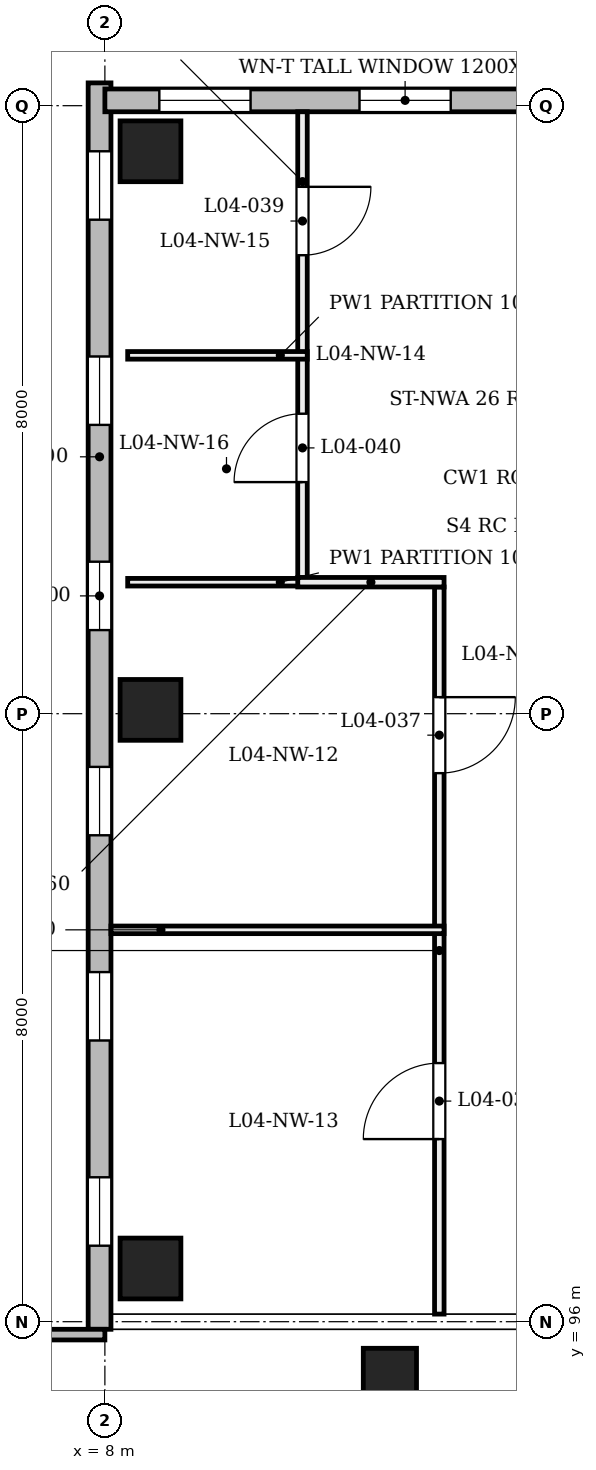
"""IFC4 building model, lengths in metres.
Left out: names, types, materials, properties, quantities, classifications, styles, units other than length and angle.
Written with IfcOpenShell. Run it as: python <this file> out.ifc"""

import sys

from ifc_helpers import new_model, si_unit, direction, frame, frame_2d, origin, origin_2d, place, context, subcontext, project, spatial, rectangle, extrude, element, fill, save


model = new_model("IFC4")
c1 = context("Model", 3, precision=1e-05, world=origin(), true_north=direction((0.0, 1.0)))
c2 = subcontext(c1, "Body", "Model", "MODEL_VIEW")
j1 = project(units=[si_unit("LENGTHUNIT", "METRE"), si_unit("PLANEANGLEUNIT", "RADIAN")], contexts=[c1])
p1 = place(None, origin())
s1 = spatial("IfcSite", under=j1, at=p1, CompositionType="ELEMENT")
p2 = place(p1, origin())
s2 = spatial("IfcBuilding", under=s1, at=p2, CompositionType="ELEMENT")
p3 = place(p2, frame((0.0, 0.0, 19.2)))
s3 = spatial("IfcBuildingStorey", under=s2, at=p3, CompositionType="ELEMENT", Elevation=19.2)
for number, where, z_axis, x_axis in (
    (1, (8.6, 96.7, 0.0), (0.0, 0.0, 1.0), (1.0, 0.0, 0.0)),
    (2, (8.6, 104.05, 0.0), (0.0, 0.0, 1.0), (1.0, 0.0, 0.0)),
    (3, (8.6, 111.4, 0.0), (0.0, 0.0, 1.0), (1.0, 0.0, 0.0)),
):
    element("IfcColumn", number, at=place(p3, frame(where, z_axis=z_axis, x_axis=x_axis)), inside=s3, PredefinedType="COLUMN", context=c2, shape_type="SweptSolid", body=[
        extrude(rectangle(XDim=0.8, YDim=0.8, at=origin_2d()), origin(), (0.0, 0.0, 1.0), 4.8),
    ])
p4 = place(p3, frame((12.0, 95.3, 0.0), z_axis=(-0.203952265704, 0.0, 0.978980833987), x_axis=(0.0, -1.0, 0.0)))
e4 = element("IfcColumn", 4, at=p4, inside=s3, PredefinedType="COLUMN", context=c2, shape_type="SweptSolid", body=[
    extrude(rectangle(XDim=0.7, YDim=0.7, at=origin_2d()), origin(), (0.0, 0.0, 1.0), 4.903),
])
p5 = place(p3, frame((7.93, 95.9, 0.0), z_axis=(0.0, 0.0, 1.0), x_axis=(0.0, 1.0, 0.0)))
e5 = element("IfcWall", 5, at=p5, inside=s3, PredefinedType="SOLIDWALL", context=c2, shape_type="SweptSolid", body=[
    extrude(rectangle(XDim=16.4, YDim=0.3, at=frame_2d((8.2, 0.0))), origin(), (0.0, 0.0, 1.0), 3.9),
])
p6 = place(p5, frame((1.1, 0.0, 0.75)))
e6 = element("IfcOpeningElement", 6, at=p6, cuts=e5, PredefinedType="OPENING", context=c2, shape_type="SweptSolid", body=[
    extrude(rectangle(XDim=0.9, YDim=3.1, at=frame_2d((0.45, 1.55))), frame((0.0, 0.16, 0.0), z_axis=(0.0, -1.0, 0.0), x_axis=(1.0, 0.0, 0.0)), (0.0, 0.0, 1.0), 0.32),
])
p7 = place(p5, frame((3.8, 0.0, 0.75)))
e7 = element("IfcOpeningElement", 7, at=p7, cuts=e5, PredefinedType="OPENING", context=c2, shape_type="SweptSolid", body=[
    extrude(rectangle(XDim=0.9, YDim=3.1, at=frame_2d((0.45, 1.55))), frame((0.0, 0.16, 0.0), z_axis=(0.0, -1.0, 0.0), x_axis=(1.0, 0.0, 0.0)), (0.0, 0.0, 1.0), 0.32),
])
p8 = place(p5, frame((6.5, 0.0, 0.75)))
e8 = element("IfcOpeningElement", 8, at=p8, cuts=e5, PredefinedType="OPENING", context=c2, shape_type="SweptSolid", body=[
    extrude(rectangle(XDim=0.9, YDim=3.1, at=frame_2d((0.45, 1.55))), frame((0.0, 0.16, 0.0), z_axis=(0.0, -1.0, 0.0), x_axis=(1.0, 0.0, 0.0)), (0.0, 0.0, 1.0), 0.32),
])
p9 = place(p5, frame((9.2, 0.0, 0.75)))
e9 = element("IfcOpeningElement", 9, at=p9, cuts=e5, PredefinedType="OPENING", context=c2, shape_type="SweptSolid", body=[
    extrude(rectangle(XDim=0.9, YDim=3.1, at=frame_2d((0.45, 1.55))), frame((0.0, 0.16, 0.0), z_axis=(0.0, -1.0, 0.0), x_axis=(1.0, 0.0, 0.0)), (0.0, 0.0, 1.0), 0.32),
])
p10 = place(p5, frame((11.9, 0.0, 0.75)))
e10 = element("IfcOpeningElement", 10, at=p10, cuts=e5, PredefinedType="OPENING", context=c2, shape_type="SweptSolid", body=[
    extrude(rectangle(XDim=0.9, YDim=3.1, at=frame_2d((0.45, 1.55))), frame((0.0, 0.16, 0.0), z_axis=(0.0, -1.0, 0.0), x_axis=(1.0, 0.0, 0.0)), (0.0, 0.0, 1.0), 0.32),
])
p11 = place(p5, frame((14.6, 0.0, 0.75)))
e11 = element("IfcOpeningElement", 11, at=p11, cuts=e5, PredefinedType="OPENING", context=c2, shape_type="SweptSolid", body=[
    extrude(rectangle(XDim=0.9, YDim=3.1, at=frame_2d((0.45, 1.55))), frame((0.0, 0.16, 0.0), z_axis=(0.0, -1.0, 0.0), x_axis=(1.0, 0.0, 0.0)), (0.0, 0.0, 1.0), 0.32),
])
p12 = place(p3, frame((8.0, 112.07, 0.0), z_axis=(0.0, 0.0, 1.0), x_axis=(1.0, 0.0, 0.0)))
e12 = element("IfcWall", 12, at=p12, inside=s3, PredefinedType="SOLIDWALL", context=c2, shape_type="SweptSolid", body=[
    extrude(rectangle(XDim=7.9, YDim=0.3, at=frame_2d((3.95, 0.0))), origin(), (0.0, 0.0, 1.0), 3.9),
])
p13 = place(p12, frame((0.717, 0.0, 0.75)))
e13 = element("IfcOpeningElement", 13, at=p13, cuts=e12, PredefinedType="OPENING", context=c2, shape_type="SweptSolid", body=[
    extrude(rectangle(XDim=1.2, YDim=3.1, at=frame_2d((0.6, 1.55))), frame((0.0, 0.16, 0.0), z_axis=(0.0, -1.0, 0.0), x_axis=(1.0, 0.0, 0.0)), (0.0, 0.0, 1.0), 0.32),
])
p14 = place(p12, frame((3.35, 0.0, 0.75)))
e14 = element("IfcOpeningElement", 14, at=p14, cuts=e12, PredefinedType="OPENING", context=c2, shape_type="SweptSolid", body=[
    extrude(rectangle(XDim=1.2, YDim=3.1, at=frame_2d((0.6, 1.55))), frame((0.0, 0.16, 0.0), z_axis=(0.0, -1.0, 0.0), x_axis=(1.0, 0.0, 0.0)), (0.0, 0.0, 1.0), 0.32),
])
p15 = place(p12, frame((5.983, 0.0, 0.75)))
e15 = element("IfcOpeningElement", 15, at=p15, cuts=e12, PredefinedType="OPENING", context=c2, shape_type="SweptSolid", body=[
    extrude(rectangle(XDim=1.2, YDim=3.1, at=frame_2d((0.6, 1.55))), frame((0.0, 0.16, 0.0), z_axis=(0.0, -1.0, 0.0), x_axis=(1.0, 0.0, 0.0)), (0.0, 0.0, 1.0), 0.32),
])
p16 = place(p3, frame((4.0, 95.83, 0.0), z_axis=(0.0, 0.0, 1.0), x_axis=(1.0, 0.0, 0.0)))
e16 = element("IfcWall", 16, at=p16, inside=s3, PredefinedType="SOLIDWALL", context=c2, shape_type="SweptSolid", body=[
    extrude(rectangle(XDim=4.0, YDim=0.14, at=frame_2d((2.0, 0.0))), origin(), (0.0, 0.0, 1.0), 3.9),
])
p17 = place(p3, frame((12.4, 96.1, 0.0), z_axis=(0.0, 0.0, 1.0), x_axis=(0.0, 1.0, 0.0)))
e17 = element("IfcWall", 17, at=p17, inside=s3, PredefinedType="PARTITIONING", context=c2, shape_type="SweptSolid", body=[
    extrude(rectangle(XDim=9.567, YDim=0.125, at=frame_2d((4.783, 0.0))), origin(), (0.0, 0.0, 1.0), 3.88),
])
p18 = place(p17, frame((7.118, 0.0, 0.0)))
e18 = element("IfcOpeningElement", 18, at=p18, cuts=e17, PredefinedType="OPENING", context=c2, shape_type="SweptSolid", body=[
    extrude(rectangle(XDim=1.0, YDim=2.1, at=frame_2d((0.5, 1.05))), frame((0.0, 0.073, 0.0), z_axis=(0.0, -1.0, 0.0), x_axis=(1.0, 0.0, 0.0)), (0.0, 0.0, 1.0), 0.145),
])
p19 = place(p17, frame((2.303, 0.0, 0.0)))
e19 = element("IfcOpeningElement", 19, at=p19, cuts=e17, PredefinedType="OPENING", context=c2, shape_type="SweptSolid", body=[
    extrude(rectangle(XDim=1.0, YDim=2.1, at=frame_2d((0.5, 1.05))), frame((0.0, 0.073, 0.0), z_axis=(0.0, -1.0, 0.0), x_axis=(1.0, 0.0, 0.0)), (0.0, 0.0, 1.0), 0.145),
])
p20 = place(p3, frame((10.6, 105.792, 0.0), z_axis=(0.0, 0.0, 1.0), x_axis=(0.0, 1.0, 0.0)))
e20 = element("IfcWall", 20, at=p20, inside=s3, PredefinedType="PARTITIONING", context=c2, shape_type="SweptSolid", body=[
    extrude(rectangle(XDim=6.128, YDim=0.125, at=frame_2d((3.064, 0.0))), origin(), (0.0, 0.0, 1.0), 3.88),
])
p21 = place(p20, frame((4.24, 0.0, 0.0)))
e21 = element("IfcOpeningElement", 21, at=p21, cuts=e20, PredefinedType="OPENING", context=c2, shape_type="SweptSolid", body=[
    extrude(rectangle(XDim=0.9, YDim=2.1, at=frame_2d((0.45, 1.05))), frame((0.0, 0.073, 0.0), z_axis=(0.0, -1.0, 0.0), x_axis=(1.0, 0.0, 0.0)), (0.0, 0.0, 1.0), 0.145),
])
p22 = place(p20, frame((1.255, 0.0, 0.0)))
e22 = element("IfcOpeningElement", 22, at=p22, cuts=e20, PredefinedType="OPENING", context=c2, shape_type="SweptSolid", body=[
    extrude(rectangle(XDim=0.9, YDim=2.1, at=frame_2d((0.45, 1.05))), frame((0.0, 0.073, 0.0), z_axis=(0.0, -1.0, 0.0), x_axis=(1.0, 0.0, 0.0)), (0.0, 0.0, 1.0), 0.145),
])
p23 = place(p3, frame((8.08, 101.156, 0.0), z_axis=(0.0, 0.0, 1.0), x_axis=(1.0, 0.0, 0.0)))
e23 = element("IfcWall", 23, at=p23, inside=s3, PredefinedType="PARTITIONING", context=c2, shape_type="SweptSolid", body=[
    extrude(rectangle(XDim=4.382, YDim=0.1, at=frame_2d((2.191, 0.0))), origin(), (0.0, 0.0, 1.0), 3.88),
])
p24 = place(p3, frame((8.3, 105.73, 0.0), z_axis=(0.0, 0.0, 1.0), x_axis=(1.0, 0.0, 0.0)))
e24 = element("IfcWall", 24, at=p24, inside=s3, PredefinedType="PARTITIONING", context=c2, shape_type="SweptSolid", body=[
    extrude(rectangle(XDim=2.363, YDim=0.1, at=frame_2d((1.181, 0.0))), origin(), (0.0, 0.0, 1.0), 3.98),
])
p25 = place(p3, frame((10.538, 105.73, 0.0), z_axis=(0.0, 0.0, 1.0), x_axis=(1.0, 0.0, 0.0)))
e25 = element("IfcWall", 25, at=p25, inside=s3, PredefinedType="PARTITIONING", context=c2, shape_type="SweptSolid", body=[
    extrude(rectangle(XDim=1.925, YDim=0.125, at=frame_2d((0.962, 0.0))), origin(), (0.0, 0.0, 1.0), 4.56),
])
p26 = place(p3, frame((8.3, 108.715, 0.0), z_axis=(0.0, 0.0, 1.0), x_axis=(1.0, 0.0, 0.0)))
e26 = element("IfcWall", 26, at=p26, inside=s3, PredefinedType="PARTITIONING", context=c2, shape_type="SweptSolid", body=[
    extrude(rectangle(XDim=2.363, YDim=0.1, at=frame_2d((1.181, 0.0))), origin(), (0.0, 0.0, 1.0), 3.98),
])
p27 = place(p6, origin())
e27 = element("IfcWindow", 27, at=p27, inside=s3, PartitioningType="SINGLE_PANEL", PredefinedType="WINDOW", context=c2, shape_type="SweptSolid", body=[
    extrude(rectangle(XDim=0.9, YDim=3.1, at=frame_2d((0.45, 1.55))), frame((0.0, 0.03, 0.0), z_axis=(0.0, -1.0, 0.0), x_axis=(1.0, 0.0, 0.0)), (0.0, 0.0, 1.0), 0.06),
])
fill(e6, e27)
p28 = place(p7, origin())
e28 = element("IfcWindow", 28, at=p28, inside=s3, PartitioningType="SINGLE_PANEL", PredefinedType="WINDOW", context=c2, shape_type="SweptSolid", body=[
    extrude(rectangle(XDim=0.9, YDim=3.1, at=frame_2d((0.45, 1.55))), frame((0.0, 0.03, 0.0), z_axis=(0.0, -1.0, 0.0), x_axis=(1.0, 0.0, 0.0)), (0.0, 0.0, 1.0), 0.06),
])
fill(e7, e28)
p29 = place(p8, origin())
e29 = element("IfcWindow", 29, at=p29, inside=s3, PartitioningType="SINGLE_PANEL", PredefinedType="WINDOW", context=c2, shape_type="SweptSolid", body=[
    extrude(rectangle(XDim=0.9, YDim=3.1, at=frame_2d((0.45, 1.55))), frame((0.0, 0.03, 0.0), z_axis=(0.0, -1.0, 0.0), x_axis=(1.0, 0.0, 0.0)), (0.0, 0.0, 1.0), 0.06),
])
fill(e8, e29)
p30 = place(p9, origin())
e30 = element("IfcWindow", 30, at=p30, inside=s3, PartitioningType="SINGLE_PANEL", PredefinedType="WINDOW", context=c2, shape_type="SweptSolid", body=[
    extrude(rectangle(XDim=0.9, YDim=3.1, at=frame_2d((0.45, 1.55))), frame((0.0, 0.03, 0.0), z_axis=(0.0, -1.0, 0.0), x_axis=(1.0, 0.0, 0.0)), (0.0, 0.0, 1.0), 0.06),
])
fill(e9, e30)
p31 = place(p10, origin())
e31 = element("IfcWindow", 31, at=p31, inside=s3, PartitioningType="SINGLE_PANEL", PredefinedType="WINDOW", context=c2, shape_type="SweptSolid", body=[
    extrude(rectangle(XDim=0.9, YDim=3.1, at=frame_2d((0.45, 1.55))), frame((0.0, 0.03, 0.0), z_axis=(0.0, -1.0, 0.0), x_axis=(1.0, 0.0, 0.0)), (0.0, 0.0, 1.0), 0.06),
])
fill(e10, e31)
p32 = place(p11, origin())
e32 = element("IfcWindow", 32, at=p32, inside=s3, PartitioningType="SINGLE_PANEL", PredefinedType="WINDOW", context=c2, shape_type="SweptSolid", body=[
    extrude(rectangle(XDim=0.9, YDim=3.1, at=frame_2d((0.45, 1.55))), frame((0.0, 0.03, 0.0), z_axis=(0.0, -1.0, 0.0), x_axis=(1.0, 0.0, 0.0)), (0.0, 0.0, 1.0), 0.06),
])
fill(e11, e32)
p33 = place(p13, origin())
e33 = element("IfcWindow", 33, at=p33, inside=s3, PartitioningType="SINGLE_PANEL", PredefinedType="WINDOW", context=c2, shape_type="SweptSolid", body=[
    extrude(rectangle(XDim=1.2, YDim=3.1, at=frame_2d((0.6, 1.55))), frame((0.0, 0.03, 0.0), z_axis=(0.0, -1.0, 0.0), x_axis=(1.0, 0.0, 0.0)), (0.0, 0.0, 1.0), 0.06),
])
fill(e13, e33)
p34 = place(p14, origin())
e34 = element("IfcWindow", 34, at=p34, inside=s3, PartitioningType="SINGLE_PANEL", PredefinedType="WINDOW", context=c2, shape_type="SweptSolid", body=[
    extrude(rectangle(XDim=1.2, YDim=3.1, at=frame_2d((0.6, 1.55))), frame((0.0, 0.03, 0.0), z_axis=(0.0, -1.0, 0.0), x_axis=(1.0, 0.0, 0.0)), (0.0, 0.0, 1.0), 0.06),
])
fill(e14, e34)
p35 = place(p18, origin())
e35 = element("IfcDoor", 35, at=p35, inside=s3, OperationType="SINGLE_SWING_RIGHT", PredefinedType="DOOR", context=c2, shape_type="SweptSolid", body=[
    extrude(rectangle(XDim=1.0, YDim=2.1, at=frame_2d((0.5, 1.05))), frame((0.0, 0.025, 0.0), z_axis=(0.0, -1.0, 0.0), x_axis=(1.0, 0.0, 0.0)), (0.0, 0.0, 1.0), 0.05),
])
fill(e18, e35)
p36 = place(p19, origin())
e36 = element("IfcDoor", 36, at=p36, inside=s3, OperationType="SINGLE_SWING_LEFT", PredefinedType="DOOR", context=c2, shape_type="SweptSolid", body=[
    extrude(rectangle(XDim=1.0, YDim=2.1, at=frame_2d((0.5, 1.05))), frame((0.0, 0.025, 0.0), z_axis=(0.0, -1.0, 0.0), x_axis=(1.0, 0.0, 0.0)), (0.0, 0.0, 1.0), 0.05),
])
fill(e19, e36)
p37 = place(p21, origin())
e37 = element("IfcDoor", 37, at=p37, inside=s3, OperationType="SINGLE_SWING_RIGHT", PredefinedType="DOOR", context=c2, shape_type="SweptSolid", body=[
    extrude(rectangle(XDim=0.9, YDim=2.1, at=frame_2d((0.45, 1.05))), frame((0.0, 0.025, 0.0), z_axis=(0.0, -1.0, 0.0), x_axis=(1.0, 0.0, 0.0)), (0.0, 0.0, 1.0), 0.05),
])
fill(e21, e37)
p38 = place(p22, origin())
e38 = element("IfcDoor", 38, at=p38, inside=s3, OperationType="SINGLE_SWING_LEFT", PredefinedType="DOOR", context=c2, shape_type="SweptSolid", body=[
    extrude(rectangle(XDim=0.9, YDim=2.1, at=frame_2d((0.45, 1.05))), frame((0.0, 0.025, 0.0), z_axis=(0.0, -1.0, 0.0), x_axis=(1.0, 0.0, 0.0)), (0.0, 0.0, 1.0), 0.05),
])
fill(e22, e38)
save(model, sys.argv[1])
